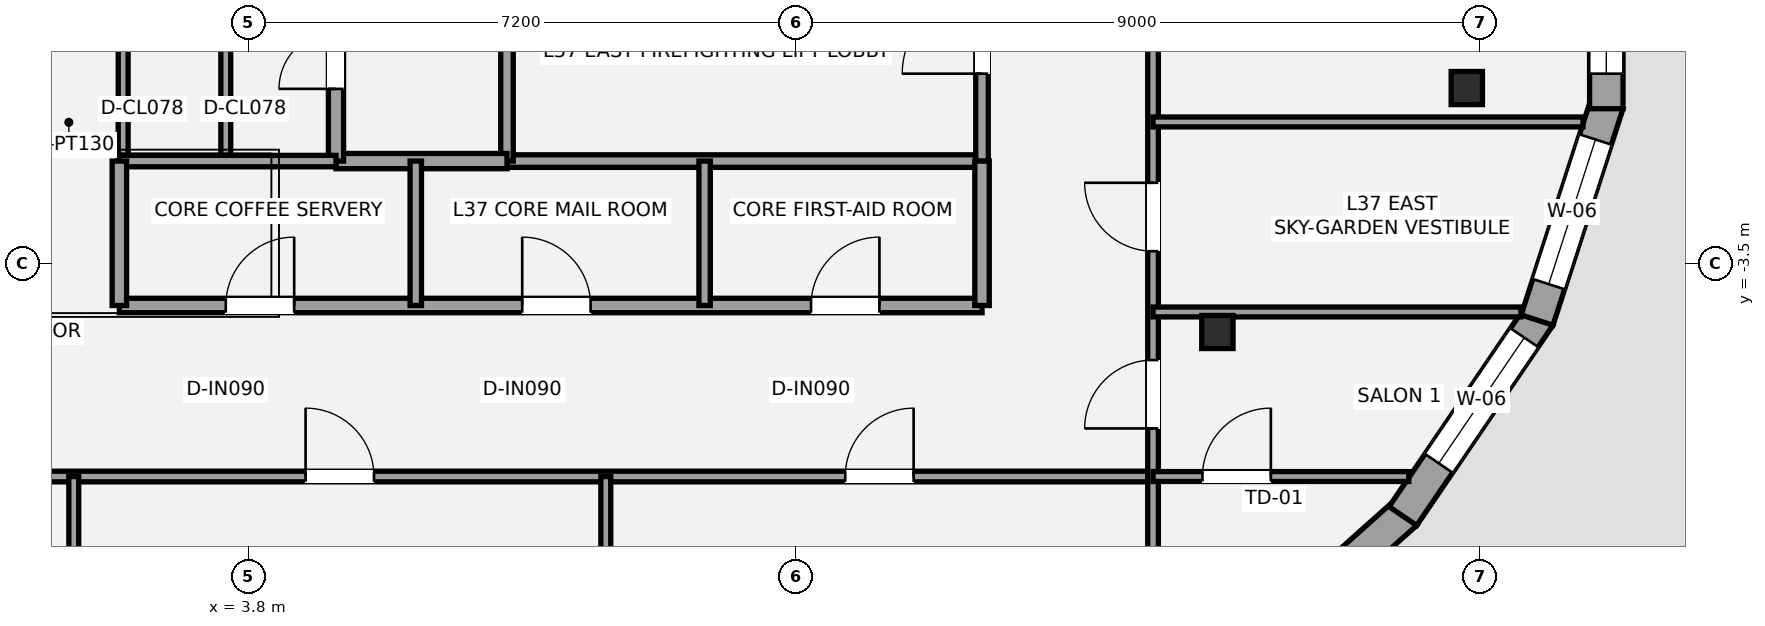
"""IFC4 building model, lengths in metres.
Left out: names, types, materials, properties, quantities, classifications, styles, units other than length and angle.
Written with IfcOpenShell. Run it as: python <this file> out.ifc"""

import sys

from ifc_helpers import new_model, si_unit, direction, frame, frame_2d, origin, origin_2d, place, context, subcontext, project, spatial, rectangle, i_section, extrude, element, fill, save


model = new_model("IFC4")
c1 = context("Model", 3, precision=1e-05, world=origin(), true_north=direction((0.0, 1.0)))
c2 = subcontext(c1, "Body", "Model", "MODEL_VIEW")
j1 = project(units=[si_unit("LENGTHUNIT", "METRE"), si_unit("PLANEANGLEUNIT", "RADIAN")], contexts=[c1])
p1 = place(None, origin())
s1 = spatial("IfcSite", under=j1, at=p1, CompositionType="ELEMENT")
p2 = place(p1, origin())
s2 = spatial("IfcBuilding", under=s1, at=p2, CompositionType="ELEMENT")
p3 = place(p2, frame((0.0, 0.0, 139.6)))
s3 = spatial("IfcBuildingStorey", under=s2, at=p3, CompositionType="ELEMENT", Elevation=139.6)
for number, where, z_axis, x_axis in (
    (1, (16.547, -4.398, 0.0), (0.0, 0.0, 1.0), (1.0, 0.0, 0.0)),
    (2, (19.828, -1.189, 0.0), (0.0, 0.0, 1.0), (1.0, 0.0, 0.0)),
):
    element("IfcColumn", number, at=place(p3, frame(where, z_axis=z_axis, x_axis=x_axis)), inside=s3, PredefinedType="COLUMN", context=c2, shape_type="SweptSolid", body=[
        extrude(i_section(OverallWidth=0.412, OverallDepth=0.435, WebThickness=0.036, FlangeThickness=0.057, at=origin_2d()), origin(), (0.0, 0.0, 1.0), 4.2),
    ])
p4 = place(p3, frame((19.023, -6.78, 0.0), z_axis=(0.0, 0.0, 1.0), x_axis=(-0.746170592537, -0.665754794825, 0.0)))
e3 = element("IfcWall", 3, at=p4, inside=s3, PredefinedType="STANDARD", context=c2, shape_type="SweptSolid", body=[
    extrude(rectangle(XDim=3.44, YDim=0.44, at=frame_2d((1.72, 0.0))), origin(), (0.0, 0.0, 1.0), 3.242),
])
p5 = place(p4, frame((1.17, 0.0, 0.0)))
e4 = element("IfcOpeningElement", 4, at=p5, cuts=e3, PredefinedType="OPENING", context=c2, shape_type="SweptSolid", body=[
    extrude(rectangle(XDim=1.1, YDim=2.15, at=frame_2d((0.55, 1.075))), frame((0.0, 0.23, 0.0), z_axis=(0.0, -1.0, 0.0), x_axis=(1.0, 0.0, 0.0)), (0.0, 0.0, 1.0), 0.46),
])
p6 = place(p3, frame((20.781, -4.186, 0.0), z_axis=(0.0, 0.0, 1.0), x_axis=(-0.562718580525, -0.826648534222, 0.0)))
e5 = element("IfcWall", 5, at=p6, inside=s3, PredefinedType="STANDARD", context=c2, shape_type="SweptSolid", body=[
    extrude(rectangle(XDim=3.187, YDim=0.44, at=frame_2d((1.593, 0.0))), origin(), (0.0, 0.0, 1.0), 3.242),
])
p7 = place(p6, frame((0.347, 0.0, 0.6)))
e6 = element("IfcOpeningElement", 6, at=p7, cuts=e5, PredefinedType="OPENING", context=c2, shape_type="SweptSolid", body=[
    extrude(rectangle(XDim=2.0, YDim=2.1, at=frame_2d((1.0, 1.05))), frame((0.0, 0.23, 0.0), z_axis=(0.0, -1.0, 0.0), x_axis=(1.0, 0.0, 0.0)), (0.0, 0.0, 1.0), 0.46),
])
p8 = place(p3, frame((21.674, -1.393, 0.0), z_axis=(0.0, 0.0, 1.0), x_axis=(-0.307750808514, -0.951466993573, 0.0)))
e7 = element("IfcWall", 7, at=p8, inside=s3, PredefinedType="STANDARD", context=c2, shape_type="SweptSolid", body=[
    extrude(rectangle(XDim=2.994, YDim=0.44, at=frame_2d((1.497, 0.0))), origin(), (0.0, 0.0, 1.0), 3.242),
])
p9 = place(p8, frame((0.497, 0.0, 0.6)))
e8 = element("IfcOpeningElement", 8, at=p9, cuts=e7, PredefinedType="OPENING", context=c2, shape_type="SweptSolid", body=[
    extrude(rectangle(XDim=2.0, YDim=2.1, at=frame_2d((1.0, 1.05))), frame((0.0, 0.23, 0.0), z_axis=(0.0, -1.0, 0.0), x_axis=(1.0, 0.0, 0.0)), (0.0, 0.0, 1.0), 0.46),
])
p10 = place(p3, frame((21.664, 1.461, 0.0), z_axis=(0.0, 0.0, 1.0), x_axis=(0.0, -1.0, 0.0)))
e9 = element("IfcWall", 9, at=p10, inside=s3, PredefinedType="STANDARD", context=c2, shape_type="SweptSolid", body=[
    extrude(rectangle(XDim=2.921, YDim=0.44, at=frame_2d((1.461, 0.0))), origin(), (0.0, 0.0, 1.0), 3.242),
])
p11 = place(p10, frame((0.461, 0.0, 0.6)))
e10 = element("IfcOpeningElement", 10, at=p11, cuts=e9, PredefinedType="OPENING", context=c2, shape_type="SweptSolid", body=[
    extrude(rectangle(XDim=2.0, YDim=2.1, at=frame_2d((1.0, 1.05))), frame((0.0, 0.23, 0.0), z_axis=(0.0, -1.0, 0.0), x_axis=(1.0, 0.0, 0.0)), (0.0, 0.0, 1.0), 0.46),
])
p12 = place(p3, frame((7.2, -2.15, 0.0), z_axis=(0.0, 0.0, 1.0), x_axis=(1.0, 0.0, 0.0)))
e11 = element("IfcWall", 11, at=p12, inside=s3, PredefinedType="PARTITIONING", context=c2, shape_type="SweptSolid", body=[
    extrude(rectangle(XDim=6.25, YDim=0.165, at=frame_2d((3.125, 0.0))), origin(), (0.0, 0.0, 1.0), 4.02),
])
p13 = place(p3, frame((7.2, -2.15, 0.0), z_axis=(0.0, 0.0, 1.0), x_axis=(0.0, 1.0, 0.0)))
e12 = element("IfcWall", 12, at=p13, inside=s3, PredefinedType="PARTITIONING", context=c2, shape_type="SweptSolid", body=[
    extrude(rectangle(XDim=3.4, YDim=0.165, at=frame_2d((1.7, 0.0))), origin(), (0.0, 0.0, 1.0), 3.473),
])
p14 = place(p3, frame((13.45, -2.15, 0.0), z_axis=(0.0, 0.0, 1.0), x_axis=(0.0, 1.0, 0.0)))
e13 = element("IfcWall", 13, at=p14, inside=s3, PredefinedType="PARTITIONING", context=c2, shape_type="SweptSolid", body=[
    extrude(rectangle(XDim=3.4, YDim=0.165, at=frame_2d((1.7, 0.0))), origin(), (0.0, 0.0, 1.0), 3.473),
])
p15 = place(p14, frame((1.15, 0.0, 0.0)))
e14 = element("IfcOpeningElement", 14, at=p15, cuts=e13, PredefinedType="OPENING", context=c2, shape_type="SweptSolid", body=[
    extrude(rectangle(XDim=1.05, YDim=2.15, at=frame_2d((0.525, 1.075))), frame((0.0, 0.093, 0.0), z_axis=(0.0, -1.0, 0.0), x_axis=(1.0, 0.0, 0.0)), (0.0, 0.0, 1.0), 0.185),
])
p16 = place(p3, frame((4.95, -2.15, 0.0), z_axis=(0.0, 0.0, 1.0), x_axis=(1.0, 0.0, 0.0)))
e15 = element("IfcWall", 15, at=p16, inside=s3, PredefinedType="SOLIDWALL", context=c2, shape_type="SweptSolid", body=[
    extrude(rectangle(XDim=2.25, YDim=0.2, at=frame_2d((1.125, 0.0))), origin(), (0.0, 0.0, 1.0), 4.02),
])
p17 = place(p3, frame((4.95, -2.15, 0.0), z_axis=(0.0, 0.0, 1.0), x_axis=(0.0, 1.0, 0.0)))
e16 = element("IfcWall", 16, at=p17, inside=s3, PredefinedType="SOLIDWALL", context=c2, shape_type="SweptSolid", body=[
    extrude(rectangle(XDim=3.4, YDim=0.2, at=frame_2d((1.7, 0.0))), origin(), (0.0, 0.0, 1.0), 3.473),
])
p18 = place(p17, frame((0.95, 0.0, 0.0)))
e17 = element("IfcOpeningElement", 17, at=p18, cuts=e16, PredefinedType="OPENING", context=c2, shape_type="SweptSolid", body=[
    extrude(rectangle(XDim=0.75, YDim=2.1, at=frame_2d((0.375, 1.05))), frame((0.0, 0.11, 0.0), z_axis=(0.0, -1.0, 0.0), x_axis=(1.0, 0.0, 0.0)), (0.0, 0.0, 1.0), 0.22),
])
for number, where, z_axis, x_axis in (
    (18, (2.15, -2.15, 0.0), (0.0, 0.0, 1.0), (0.0, 1.0, 0.0)),
    (19, (3.5, -2.15, 0.0), (0.0, 0.0, 1.0), (0.0, 1.0, 0.0)),
):
    element("IfcWall", number, at=place(p3, frame(where, z_axis=z_axis, x_axis=x_axis)), inside=s3, PredefinedType="PARTITIONING", context=c2, shape_type="SweptSolid", body=[
        extrude(rectangle(XDim=1.8, YDim=0.13, at=frame_2d((0.9, 0.0))), origin(), (0.0, 0.0, 1.0), 4.02),
    ])
p19 = place(p3, frame((2.1, -4.05, 0.0), z_axis=(0.0, 0.0, 1.0), x_axis=(1.0, 0.0, 0.0)))
e20 = element("IfcWall", 20, at=p19, inside=s3, PredefinedType="PLUMBINGWALL", context=c2, shape_type="SweptSolid", body=[
    extrude(rectangle(XDim=11.35, YDim=0.19, at=frame_2d((5.675, 0.0))), origin(), (0.0, 0.0, 1.0), 3.555),
])
p20 = place(p19, frame((1.4, 0.0, 0.0)))
e21 = element("IfcOpeningElement", 21, at=p20, cuts=e20, PredefinedType="OPENING", context=c2, shape_type="SweptSolid", body=[
    extrude(rectangle(XDim=0.9, YDim=2.1, at=frame_2d((0.45, 1.05))), frame((0.0, 0.105, 0.0), z_axis=(0.0, -1.0, 0.0), x_axis=(1.0, 0.0, 0.0)), (0.0, 0.0, 1.0), 0.21),
])
p21 = place(p19, frame((5.3, 0.0, 0.0)))
e22 = element("IfcOpeningElement", 22, at=p21, cuts=e20, PredefinedType="OPENING", context=c2, shape_type="SweptSolid", body=[
    extrude(rectangle(XDim=0.9, YDim=2.1, at=frame_2d((0.45, 1.05))), frame((0.0, 0.105, 0.0), z_axis=(0.0, -1.0, 0.0), x_axis=(1.0, 0.0, 0.0)), (0.0, 0.0, 1.0), 0.21),
])
p22 = place(p19, frame((9.1, 0.0, 0.0)))
e23 = element("IfcOpeningElement", 23, at=p22, cuts=e20, PredefinedType="OPENING", context=c2, shape_type="SweptSolid", body=[
    extrude(rectangle(XDim=0.9, YDim=2.1, at=frame_2d((0.45, 1.05))), frame((0.0, 0.105, 0.0), z_axis=(0.0, -1.0, 0.0), x_axis=(1.0, 0.0, 0.0)), (0.0, 0.0, 1.0), 0.21),
])
p23 = place(p3, frame((2.1, -2.15, 0.0), z_axis=(0.0, 0.0, 1.0), x_axis=(1.0, 0.0, 0.0)))
e24 = element("IfcWall", 24, at=p23, inside=s3, PredefinedType="PLUMBINGWALL", context=c2, shape_type="SweptSolid", body=[
    extrude(rectangle(XDim=2.85, YDim=0.15, at=frame_2d((1.425, 0.0))), origin(), (0.0, 0.0, 1.0), 4.02),
])
p24 = place(p3, frame((2.1, -4.05, 0.0), z_axis=(0.0, 0.0, 1.0), x_axis=(0.0, 1.0, 0.0)))
e25 = element("IfcWall", 25, at=p24, inside=s3, PredefinedType="PLUMBINGWALL", context=c2, shape_type="SweptSolid", body=[
    extrude(rectangle(XDim=1.9, YDim=0.19, at=frame_2d((0.95, 0.0))), origin(), (0.0, 0.0, 1.0), 4.02),
])
p25 = place(p3, frame((13.45, -4.05, 0.0), z_axis=(0.0, 0.0, 1.0), x_axis=(0.0, 1.0, 0.0)))
e26 = element("IfcWall", 26, at=p25, inside=s3, PredefinedType="PLUMBINGWALL", context=c2, shape_type="SweptSolid", body=[
    extrude(rectangle(XDim=1.9, YDim=0.19, at=frame_2d((0.95, 0.0))), origin(), (0.0, 0.0, 1.0), 3.473),
])
p26 = place(p3, frame((6.0, -4.05, 0.0), z_axis=(0.0, 0.0, 1.0), x_axis=(0.0, 1.0, 0.0)))
e27 = element("IfcWall", 27, at=p26, inside=s3, PredefinedType="PLUMBINGWALL", context=c2, shape_type="SweptSolid", body=[
    extrude(rectangle(XDim=1.9, YDim=0.15, at=frame_2d((0.95, 0.0))), origin(), (0.0, 0.0, 1.0), 3.473),
])
p27 = place(p3, frame((9.8, -4.05, 0.0), z_axis=(0.0, 0.0, 1.0), x_axis=(0.0, 1.0, 0.0)))
e28 = element("IfcWall", 28, at=p27, inside=s3, PredefinedType="PLUMBINGWALL", context=c2, shape_type="SweptSolid", body=[
    extrude(rectangle(XDim=1.9, YDim=0.15, at=frame_2d((0.95, 0.0))), origin(), (0.0, 0.0, 1.0), 4.02),
])
p28 = place(p3, frame((-16.6, -6.3, 0.0), z_axis=(0.0, 0.0, 1.0), x_axis=(1.0, 0.0, 0.0)))
e29 = element("IfcWall", 29, at=p28, inside=s3, PredefinedType="PARTITIONING", context=c2, shape_type="SweptSolid", body=[
    extrude(rectangle(XDim=32.3, YDim=0.14, at=frame_2d((16.15, 0.0))), origin(), (0.0, 0.0, 1.0), 3.398),
])
p29 = place(p28, frame((3.35, 0.0, 0.0)))
e30 = element("IfcOpeningElement", 30, at=p29, cuts=e29, PredefinedType="OPENING", context=c2, shape_type="SweptSolid", body=[
    extrude(rectangle(XDim=0.9, YDim=2.1, at=frame_2d((0.45, 1.05))), frame((0.0, 0.08, 0.0), z_axis=(0.0, -1.0, 0.0), x_axis=(1.0, 0.0, 0.0)), (0.0, 0.0, 1.0), 0.16),
])
p30 = place(p28, frame((12.4, 0.0, 0.0)))
e31 = element("IfcOpeningElement", 31, at=p30, cuts=e29, PredefinedType="OPENING", context=c2, shape_type="SweptSolid", body=[
    extrude(rectangle(XDim=0.9, YDim=2.1, at=frame_2d((0.45, 1.05))), frame((0.0, 0.08, 0.0), z_axis=(0.0, -1.0, 0.0), x_axis=(1.0, 0.0, 0.0)), (0.0, 0.0, 1.0), 0.16),
])
p31 = place(p28, frame((21.15, 0.0, 0.0)))
e32 = element("IfcOpeningElement", 32, at=p31, cuts=e29, PredefinedType="OPENING", context=c2, shape_type="SweptSolid", body=[
    extrude(rectangle(XDim=0.9, YDim=2.1, at=frame_2d((0.45, 1.05))), frame((0.0, 0.08, 0.0), z_axis=(0.0, -1.0, 0.0), x_axis=(1.0, 0.0, 0.0)), (0.0, 0.0, 1.0), 0.16),
])
p32 = place(p28, frame((28.25, 0.0, 0.0)))
e33 = element("IfcOpeningElement", 33, at=p32, cuts=e29, PredefinedType="OPENING", context=c2, shape_type="SweptSolid", body=[
    extrude(rectangle(XDim=0.9, YDim=2.1, at=frame_2d((0.45, 1.05))), frame((0.0, 0.08, 0.0), z_axis=(0.0, -1.0, 0.0), x_axis=(1.0, 0.0, 0.0)), (0.0, 0.0, 1.0), 0.16),
])
p33 = place(p3, frame((15.7, -13.488, 0.0), z_axis=(0.0, 0.0, 1.0), x_axis=(0.0, 1.0, 0.0)))
e34 = element("IfcWall", 34, at=p33, inside=s3, PredefinedType="PARTITIONING", context=c2, shape_type="SweptSolid", body=[
    extrude(rectangle(XDim=21.038, YDim=0.14, at=frame_2d((10.519, 0.0))), origin(), (0.0, 0.0, 1.0), 3.473),
])
p34 = place(p33, frame((7.821, 0.0, 0.0)))
e35 = element("IfcOpeningElement", 35, at=p34, cuts=e34, PredefinedType="OPENING", context=c2, shape_type="SweptSolid", body=[
    extrude(rectangle(XDim=0.9, YDim=2.1, at=frame_2d((0.45, 1.05))), frame((0.0, 0.08, 0.0), z_axis=(0.0, -1.0, 0.0), x_axis=(1.0, 0.0, 0.0)), (0.0, 0.0, 1.0), 0.16),
])
p35 = place(p33, frame((10.153, 0.0, 0.0)))
e36 = element("IfcOpeningElement", 36, at=p35, cuts=e34, PredefinedType="OPENING", context=c2, shape_type="SweptSolid", body=[
    extrude(rectangle(XDim=0.9, YDim=2.1, at=frame_2d((0.45, 1.05))), frame((0.0, 0.08, 0.0), z_axis=(0.0, -1.0, 0.0), x_axis=(1.0, 0.0, 0.0)), (0.0, 0.0, 1.0), 0.16),
])
p36 = place(p33, frame((13.921, 0.0, 0.0)))
e37 = element("IfcOpeningElement", 37, at=p36, cuts=e34, PredefinedType="OPENING", context=c2, shape_type="SweptSolid", body=[
    extrude(rectangle(XDim=0.9, YDim=2.1, at=frame_2d((0.45, 1.05))), frame((0.0, 0.08, 0.0), z_axis=(0.0, -1.0, 0.0), x_axis=(1.0, 0.0, 0.0)), (0.0, 0.0, 1.0), 0.16),
])
p37 = place(p33, frame((18.513, 0.0, 0.0)))
e38 = element("IfcOpeningElement", 38, at=p37, cuts=e34, PredefinedType="OPENING", context=c2, shape_type="SweptSolid", body=[
    extrude(rectangle(XDim=0.9, YDim=2.1, at=frame_2d((0.45, 1.05))), frame((0.0, 0.08, 0.0), z_axis=(0.0, -1.0, 0.0), x_axis=(1.0, 0.0, 0.0)), (0.0, 0.0, 1.0), 0.16),
])
p38 = place(p3, frame((1.5, -17.087, 0.0), z_axis=(0.0, 0.0, 1.0), x_axis=(0.0, 1.0, 0.0)))
e39 = element("IfcWall", 39, at=p38, inside=s3, PredefinedType="PARTITIONING", context=c2, shape_type="SweptSolid", body=[
    extrude(rectangle(XDim=10.787, YDim=0.13, at=frame_2d((5.394, 0.0))), origin(), (0.0, 0.0, 1.0), 3.473),
])
p39 = place(p3, frame((8.5, -16.129, 0.0), z_axis=(0.0, 0.0, 1.0), x_axis=(0.0, 1.0, 0.0)))
e40 = element("IfcWall", 40, at=p39, inside=s3, PredefinedType="PARTITIONING", context=c2, shape_type="SweptSolid", body=[
    extrude(rectangle(XDim=9.829, YDim=0.13, at=frame_2d((4.914, 0.0))), origin(), (0.0, 0.0, 1.0), 4.02),
])
p40 = place(p3, frame((15.7, -6.3, 0.0), z_axis=(0.0, 0.0, 1.0), x_axis=(1.0, 0.0, 0.0)))
e41 = element("IfcWall", 41, at=p40, inside=s3, PredefinedType="PARTITIONING", context=c2, shape_type="SweptSolid", body=[
    extrude(rectangle(XDim=3.365, YDim=0.13, at=frame_2d((1.683, 0.0))), origin(), (0.0, 0.0, 1.0), 4.02),
])
p41 = place(p40, frame((0.65, 0.0, 0.0)))
e42 = element("IfcOpeningElement", 42, at=p41, cuts=e41, PredefinedType="OPENING", context=c2, shape_type="SweptSolid", body=[
    extrude(rectangle(XDim=0.9, YDim=2.1, at=frame_2d((0.45, 1.05))), frame((0.0, 0.075, 0.0), z_axis=(0.0, -1.0, 0.0), x_axis=(1.0, 0.0, 0.0)), (0.0, 0.0, 1.0), 0.15),
])
p42 = place(p3, frame((15.7, -4.135, 0.0), z_axis=(0.0, 0.0, 1.0), x_axis=(1.0, 0.0, 0.0)))
e43 = element("IfcWall", 43, at=p42, inside=s3, PredefinedType="PARTITIONING", context=c2, shape_type="SweptSolid", body=[
    extrude(rectangle(XDim=4.839, YDim=0.13, at=frame_2d((2.419, 0.0))), origin(), (0.0, 0.0, 1.0), 3.398),
])
p43 = place(p3, frame((15.7, -1.635, 0.0), z_axis=(0.0, 0.0, 1.0), x_axis=(1.0, 0.0, 0.0)))
e44 = element("IfcWall", 44, at=p43, inside=s3, PredefinedType="PARTITIONING", context=c2, shape_type="SweptSolid", body=[
    extrude(rectangle(XDim=5.656, YDim=0.13, at=frame_2d((2.828, 0.0))), origin(), (0.0, 0.0, 1.0), 3.398),
])
p44 = place(p7, origin())
e45 = element("IfcWindow", 45, at=p44, inside=s3, PartitioningType="SINGLE_PANEL", PredefinedType="WINDOW", context=c2, shape_type="SweptSolid", body=[
    extrude(rectangle(XDim=2.0, YDim=2.1, at=frame_2d((1.0, 1.05))), frame((0.0, -0.01, 0.0), z_axis=(0.0, -1.0, 0.0), x_axis=(1.0, 0.0, 0.0)), (0.0, 0.0, 1.0), 0.06),
])
fill(e6, e45)
p45 = place(p9, origin())
e46 = element("IfcWindow", 46, at=p45, inside=s3, PartitioningType="SINGLE_PANEL", PredefinedType="WINDOW", context=c2, shape_type="SweptSolid", body=[
    extrude(rectangle(XDim=2.0, YDim=2.1, at=frame_2d((1.0, 1.05))), frame((0.0, -0.01, 0.0), z_axis=(0.0, -1.0, 0.0), x_axis=(1.0, 0.0, 0.0)), (0.0, 0.0, 1.0), 0.06),
])
fill(e8, e46)
p46 = place(p11, origin())
e47 = element("IfcWindow", 47, at=p46, inside=s3, PartitioningType="SINGLE_PANEL", PredefinedType="WINDOW", context=c2, shape_type="SweptSolid", body=[
    extrude(rectangle(XDim=2.0, YDim=2.1, at=frame_2d((1.0, 1.05))), frame((0.0, -0.01, 0.0), z_axis=(0.0, -1.0, 0.0), x_axis=(1.0, 0.0, 0.0)), (0.0, 0.0, 1.0), 0.06),
])
fill(e10, e47)
p47 = place(p15, origin())
e48 = element("IfcDoor", 48, at=p47, inside=s3, OperationType="SINGLE_SWING_LEFT", PredefinedType="DOOR", context=c2, shape_type="SweptSolid", body=[
    extrude(rectangle(XDim=1.05, YDim=2.15, at=frame_2d((0.525, 1.075))), frame((0.0, 0.025, 0.0), z_axis=(0.0, -1.0, 0.0), x_axis=(1.0, 0.0, 0.0)), (0.0, 0.0, 1.0), 0.05),
])
fill(e14, e48)
p48 = place(p18, origin())
e49 = element("IfcDoor", 49, at=p48, inside=s3, OperationType="SINGLE_SWING_LEFT", PredefinedType="DOOR", context=c2, shape_type="SweptSolid", body=[
    extrude(rectangle(XDim=0.75, YDim=2.1, at=frame_2d((0.375, 1.05))), frame((0.0, 0.025, 0.0), z_axis=(0.0, -1.0, 0.0), x_axis=(1.0, 0.0, 0.0)), (0.0, 0.0, 1.0), 0.05),
])
fill(e17, e49)
p49 = place(p20, origin())
e50 = element("IfcDoor", 50, at=p49, inside=s3, OperationType="SINGLE_SWING_RIGHT", PredefinedType="DOOR", context=c2, shape_type="SweptSolid", body=[
    extrude(rectangle(XDim=0.9, YDim=2.1, at=frame_2d((0.45, 1.05))), frame((0.0, 0.025, 0.0), z_axis=(0.0, -1.0, 0.0), x_axis=(1.0, 0.0, 0.0)), (0.0, 0.0, 1.0), 0.05),
])
fill(e21, e50)
p50 = place(p21, origin())
e51 = element("IfcDoor", 51, at=p50, inside=s3, OperationType="SINGLE_SWING_LEFT", PredefinedType="DOOR", context=c2, shape_type="SweptSolid", body=[
    extrude(rectangle(XDim=0.9, YDim=2.1, at=frame_2d((0.45, 1.05))), frame((0.0, 0.025, 0.0), z_axis=(0.0, -1.0, 0.0), x_axis=(1.0, 0.0, 0.0)), (0.0, 0.0, 1.0), 0.05),
])
fill(e22, e51)
p51 = place(p22, origin())
e52 = element("IfcDoor", 52, at=p51, inside=s3, OperationType="SINGLE_SWING_RIGHT", PredefinedType="DOOR", context=c2, shape_type="SweptSolid", body=[
    extrude(rectangle(XDim=0.9, YDim=2.1, at=frame_2d((0.45, 1.05))), frame((0.0, 0.025, 0.0), z_axis=(0.0, -1.0, 0.0), x_axis=(1.0, 0.0, 0.0)), (0.0, 0.0, 1.0), 0.05),
])
fill(e23, e52)
p52 = place(p31, origin())
e53 = element("IfcDoor", 53, at=p52, inside=s3, OperationType="SINGLE_SWING_LEFT", PredefinedType="DOOR", context=c2, shape_type="SweptSolid", body=[
    extrude(rectangle(XDim=0.9, YDim=2.1, at=frame_2d((0.45, 1.05))), frame((0.0, 0.025, 0.0), z_axis=(0.0, -1.0, 0.0), x_axis=(1.0, 0.0, 0.0)), (0.0, 0.0, 1.0), 0.05),
])
fill(e32, e53)
p53 = place(p32, origin())
e54 = element("IfcDoor", 54, at=p53, inside=s3, OperationType="SINGLE_SWING_RIGHT", PredefinedType="DOOR", context=c2, shape_type="SweptSolid", body=[
    extrude(rectangle(XDim=0.9, YDim=2.1, at=frame_2d((0.45, 1.05))), frame((0.0, 0.025, 0.0), z_axis=(0.0, -1.0, 0.0), x_axis=(1.0, 0.0, 0.0)), (0.0, 0.0, 1.0), 0.05),
])
fill(e33, e54)
p54 = place(p41, origin())
e55 = element("IfcDoor", 55, at=p54, inside=s3, OperationType="SINGLE_SWING_RIGHT", PredefinedType="DOOR", context=c2, shape_type="SweptSolid", body=[
    extrude(rectangle(XDim=0.9, YDim=2.1, at=frame_2d((0.45, 1.05))), frame((0.0, 0.025, 0.0), z_axis=(0.0, -1.0, 0.0), x_axis=(1.0, 0.0, 0.0)), (0.0, 0.0, 1.0), 0.05),
])
fill(e42, e55)
p55 = place(p34, origin())
e56 = element("IfcDoor", 56, at=p55, inside=s3, OperationType="SINGLE_SWING_LEFT", PredefinedType="DOOR", context=c2, shape_type="SweptSolid", body=[
    extrude(rectangle(XDim=0.9, YDim=2.1, at=frame_2d((0.45, 1.05))), frame((0.0, 0.025, 0.0), z_axis=(0.0, -1.0, 0.0), x_axis=(1.0, 0.0, 0.0)), (0.0, 0.0, 1.0), 0.05),
])
fill(e35, e56)
p56 = place(p35, origin())
e57 = element("IfcDoor", 57, at=p56, inside=s3, OperationType="SINGLE_SWING_RIGHT", PredefinedType="DOOR", context=c2, shape_type="SweptSolid", body=[
    extrude(rectangle(XDim=0.9, YDim=2.1, at=frame_2d((0.45, 1.05))), frame((0.0, 0.025, 0.0), z_axis=(0.0, -1.0, 0.0), x_axis=(1.0, 0.0, 0.0)), (0.0, 0.0, 1.0), 0.05),
])
fill(e36, e57)
save(model, sys.argv[1])
